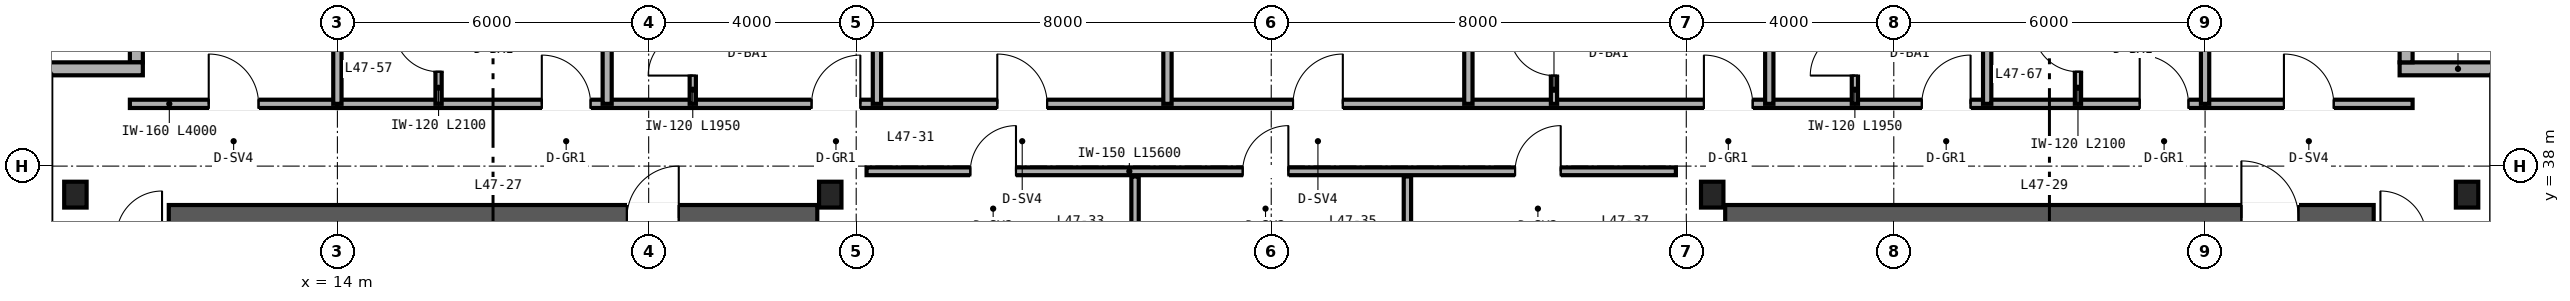
"""IFC4 building model, lengths in metres.
Left out: names, types, materials, properties, quantities, classifications, styles, units other than length and angle.
Written with IfcOpenShell. Run it as: python <this file> out.ifc"""

import sys

from ifc_helpers import new_model, si_unit, direction, frame, frame_2d, origin, origin_2d, place, context, subcontext, project, spatial, rectangle, i_section, extrude, source, transform, mapped, element, fill, save


model = new_model("IFC4")
c1 = context("Model", 3, precision=1e-05, world=origin(), true_north=direction((0.0, 1.0)))
c2 = subcontext(c1, "Body", "Model", "MODEL_VIEW")
j1 = project(units=[si_unit("LENGTHUNIT", "METRE"), si_unit("PLANEANGLEUNIT", "RADIAN")], contexts=[c1])
p1 = place(None, origin())
s1 = spatial("IfcSite", under=j1, at=p1, CompositionType="ELEMENT")
p2 = place(p1, origin())
s2 = spatial("IfcBuilding", under=s1, at=p2, CompositionType="ELEMENT")
p3 = place(p2, frame((0.0, 0.0, 188.4)))
s3 = spatial("IfcBuildingStorey", under=s2, at=p3, CompositionType="ELEMENT", Elevation=188.4)
p4 = place(p3, frame((10.75, 37.0, 0.0), z_axis=(0.0, 0.0, 1.0), x_axis=(1.0, 0.0, 0.0)))
e1 = element("IfcWall", 1, at=p4, inside=s3, PredefinedType="SHEAR", context=c2, shape_type="SweptSolid", body=[
    extrude(rectangle(XDim=12.5, YDim=0.5, at=frame_2d((6.25, 0.0))), origin(), (0.0, 0.0, 1.0), 3.37),
])
p5 = place(p4, frame((8.83, 0.0, 0.0)))
e2 = element("IfcOpeningElement", 2, at=p5, cuts=e1, PredefinedType="OPENING", context=c2, shape_type="SweptSolid", body=[
    extrude(rectangle(XDim=1.0, YDim=2.15, at=frame_2d((0.5, 1.075))), frame((0.0, 0.26, 0.0), z_axis=(0.0, -1.0, 0.0), x_axis=(1.0, 0.0, 0.0)), (0.0, 0.0, 1.0), 0.52),
])
p6 = place(p3, frame((40.75, 37.0, 0.0), z_axis=(0.0, 0.0, 1.0), x_axis=(1.0, 0.0, 0.0)))
e3 = element("IfcWall", 3, at=p6, inside=s3, PredefinedType="SHEAR", context=c2, shape_type="SweptSolid", body=[
    extrude(rectangle(XDim=12.5, YDim=0.5, at=frame_2d((6.25, 0.0))), origin(), (0.0, 0.0, 1.0), 3.37),
])
p7 = place(p6, frame((9.95, 0.0, 0.0)))
e4 = element("IfcOpeningElement", 4, at=p7, cuts=e3, PredefinedType="OPENING", context=c2, shape_type="SweptSolid", body=[
    extrude(rectangle(XDim=1.1, YDim=2.15, at=frame_2d((0.55, 1.075))), frame((0.0, 0.26, 0.0), z_axis=(0.0, -1.0, 0.0), x_axis=(1.0, 0.0, 0.0)), (0.0, 0.0, 1.0), 0.52),
])
m1 = source(origin(), c2, "Body", "SweptSolid", [
    extrude(i_section(OverallWidth=0.432, OverallDepth=0.498, WebThickness=0.056, FlangeThickness=0.089, FilletRadius=0.025, at=origin_2d()), origin(), (0.0, 0.0, 1.0), 3.37),
])
for number, where, z_axis, x_axis in (
    (5, (8.95, 37.45, 0.0), (0.0, 0.0, 1.0), (1.0, 0.0, 0.0)),
    (6, (23.5, 37.45, 0.0), (0.0, 0.0, 1.0), (1.0, 0.0, 0.0)),
    (7, (40.5, 37.45, 0.0), (0.0, 0.0, 1.0), (1.0, 0.0, 0.0)),
    (8, (55.05, 37.45, 0.0), (0.0, 0.0, 1.0), (1.0, 0.0, 0.0)),
):
    element("IfcColumn", number, at=place(p3, frame(where, z_axis=z_axis, x_axis=x_axis)), inside=s3, PredefinedType="COLUMN", context=c2, shape_type="MappedRepresentation", body=[
        mapped(m1, transform((0.0, 0.0, 0.0), scale=1.0)),
    ])
p8 = place(p3, frame((56.0, 39.875, 0.0), z_axis=(0.0, 0.0, 1.0), x_axis=(-1.0, 0.0, 0.0)))
e9 = element("IfcWall", 9, at=p8, inside=s3, PredefinedType="SOLIDWALL", context=c2, shape_type="SweptSolid", body=[
    extrude(rectangle(XDim=2.25, YDim=0.25, at=frame_2d((1.125, 0.0))), origin(), (0.0, 0.0, 1.0), 3.37),
])
for number, where, z_axis, x_axis in (
    (10, (53.875, 40.0, 0.0), (0.0, 0.0, 1.0), (0.0, 1.0, 0.0)),
    (11, (10.125, 42.0, 0.0), (0.0, 0.0, 1.0), (0.0, -1.0, 0.0)),
):
    element("IfcWall", number, at=place(p3, frame(where, z_axis=z_axis, x_axis=x_axis)), inside=s3, PredefinedType="SOLIDWALL", context=c2, shape_type="SweptSolid", body=[
        extrude(rectangle(XDim=2.0, YDim=0.25, at=frame_2d((1.0, 0.0))), origin(), (0.0, 0.0, 1.0), 3.37),
    ])
p9 = place(p3, frame((10.25, 39.875, 0.0), z_axis=(0.0, 0.0, 1.0), x_axis=(-1.0, 0.0, 0.0)))
e12 = element("IfcWall", 12, at=p9, inside=s3, PredefinedType="SOLIDWALL", context=c2, shape_type="SweptSolid", body=[
    extrude(rectangle(XDim=2.25, YDim=0.25, at=frame_2d((1.125, 0.0))), origin(), (0.0, 0.0, 1.0), 3.37),
])
p10 = place(p3, frame((24.2, 37.9, 0.0), z_axis=(0.0, 0.0, 1.0), x_axis=(1.0, 0.0, 0.0)))
e13 = element("IfcWall", 13, at=p10, inside=s3, PredefinedType="PARTITIONING", context=c2, shape_type="SweptSolid", body=[
    extrude(rectangle(XDim=15.6, YDim=0.15, at=frame_2d((7.8, 0.0))), origin(), (0.0, 0.0, 1.0), 3.37),
])
p11 = place(p10, frame((2.0, 0.0, 0.0)))
e14 = element("IfcOpeningElement", 14, at=p11, cuts=e13, PredefinedType="OPENING", context=c2, shape_type="SweptSolid", body=[
    extrude(rectangle(XDim=0.88, YDim=2.15, at=frame_2d((0.44, 1.075))), frame((0.0, 0.085, 0.0), z_axis=(0.0, -1.0, 0.0), x_axis=(1.0, 0.0, 0.0)), (0.0, 0.0, 1.0), 0.17),
])
p12 = place(p10, frame((7.25, 0.0, 0.0)))
e15 = element("IfcOpeningElement", 15, at=p12, cuts=e13, PredefinedType="OPENING", context=c2, shape_type="SweptSolid", body=[
    extrude(rectangle(XDim=0.88, YDim=2.15, at=frame_2d((0.44, 1.075))), frame((0.0, 0.085, 0.0), z_axis=(0.0, -1.0, 0.0), x_axis=(1.0, 0.0, 0.0)), (0.0, 0.0, 1.0), 0.17),
])
p13 = place(p10, frame((12.5, 0.0, 0.0)))
e16 = element("IfcOpeningElement", 16, at=p13, cuts=e13, PredefinedType="OPENING", context=c2, shape_type="SweptSolid", body=[
    extrude(rectangle(XDim=0.88, YDim=2.15, at=frame_2d((0.44, 1.075))), frame((0.0, 0.085, 0.0), z_axis=(0.0, -1.0, 0.0), x_axis=(1.0, 0.0, 0.0)), (0.0, 0.0, 1.0), 0.17),
])
for number, where, z_axis, x_axis in (
    (17, (29.375, 36.12, 0.0), (0.0, 0.0, 1.0), (0.0, 1.0, 0.0)),
    (18, (34.625, 36.12, 0.0), (0.0, 0.0, 1.0), (0.0, 1.0, 0.0)),
):
    element("IfcWall", number, at=place(p3, frame(where, z_axis=z_axis, x_axis=x_axis)), inside=s3, PredefinedType="PARTITIONING", context=c2, shape_type="SweptSolid", body=[
        extrude(rectangle(XDim=1.68, YDim=0.142, at=frame_2d((0.84, 0.0))), origin(), (0.0, 0.0, 1.0), 3.37),
    ])
p14 = place(p3, frame((10.0, 39.2, 0.0), z_axis=(0.0, 0.0, 1.0), x_axis=(1.0, 0.0, 0.0)))
e19 = element("IfcWall", 19, at=p14, inside=s3, PredefinedType="PARTITIONING", context=c2, shape_type="SweptSolid", body=[
    extrude(rectangle(XDim=4.0, YDim=0.16, at=frame_2d((2.0, 0.0))), origin(), (0.0, 0.0, 1.0), 3.37),
])
p15 = place(p14, frame((1.52, 0.0, 0.0)))
e20 = element("IfcOpeningElement", 20, at=p15, cuts=e19, PredefinedType="OPENING", context=c2, shape_type="SweptSolid", body=[
    extrude(rectangle(XDim=0.96, YDim=2.15, at=frame_2d((0.48, 1.075))), frame((0.0, 0.09, 0.0), z_axis=(0.0, -1.0, 0.0), x_axis=(1.0, 0.0, 0.0)), (0.0, 0.0, 1.0), 0.18),
])
p16 = place(p3, frame((50.0, 39.2, 0.0), z_axis=(0.0, 0.0, 1.0), x_axis=(1.0, 0.0, 0.0)))
e21 = element("IfcWall", 21, at=p16, inside=s3, PredefinedType="PARTITIONING", context=c2, shape_type="SweptSolid", body=[
    extrude(rectangle(XDim=4.0, YDim=0.16, at=frame_2d((2.0, 0.0))), origin(), (0.0, 0.0, 1.0), 3.37),
])
p17 = place(p16, frame((1.52, 0.0, 0.0)))
e22 = element("IfcOpeningElement", 22, at=p17, cuts=e21, PredefinedType="OPENING", context=c2, shape_type="SweptSolid", body=[
    extrude(rectangle(XDim=0.96, YDim=2.15, at=frame_2d((0.48, 1.075))), frame((0.0, 0.09, 0.0), z_axis=(0.0, -1.0, 0.0), x_axis=(1.0, 0.0, 0.0)), (0.0, 0.0, 1.0), 0.18),
])
p18 = place(p3, frame((14.0, 39.2, 0.0), z_axis=(0.0, 0.0, 1.0), x_axis=(1.0, 0.0, 0.0)))
e23 = element("IfcWall", 23, at=p18, inside=s3, PredefinedType="PARTITIONING", context=c2, shape_type="SweptSolid", body=[
    extrude(rectangle(XDim=36.0, YDim=0.16, at=frame_2d((18.0, 0.0))), origin(), (0.0, 0.0, 1.0), 2.913),
])
p19 = place(p18, frame((3.94, 0.0, 0.0)))
e24 = element("IfcOpeningElement", 24, at=p19, cuts=e23, PredefinedType="OPENING", context=c2, shape_type="SweptSolid", body=[
    extrude(rectangle(XDim=0.94, YDim=2.15, at=frame_2d((0.47, 1.075))), frame((0.0, 0.09, 0.0), z_axis=(0.0, -1.0, 0.0), x_axis=(1.0, 0.0, 0.0)), (0.0, 0.0, 1.0), 0.18),
])
p20 = place(p18, frame((9.14, 0.0, 0.0)))
e25 = element("IfcOpeningElement", 25, at=p20, cuts=e23, PredefinedType="OPENING", context=c2, shape_type="SweptSolid", body=[
    extrude(rectangle(XDim=0.94, YDim=2.15, at=frame_2d((0.47, 1.075))), frame((0.0, 0.09, 0.0), z_axis=(0.0, -1.0, 0.0), x_axis=(1.0, 0.0, 0.0)), (0.0, 0.0, 1.0), 0.18),
])
p21 = place(p18, frame((12.72, 0.0, 0.0)))
e26 = element("IfcOpeningElement", 26, at=p21, cuts=e23, PredefinedType="OPENING", context=c2, shape_type="SweptSolid", body=[
    extrude(rectangle(XDim=0.96, YDim=2.15, at=frame_2d((0.48, 1.075))), frame((0.0, 0.09, 0.0), z_axis=(0.0, -1.0, 0.0), x_axis=(1.0, 0.0, 0.0)), (0.0, 0.0, 1.0), 0.18),
])
p22 = place(p18, frame((18.42, 0.0, 0.0)))
e27 = element("IfcOpeningElement", 27, at=p22, cuts=e23, PredefinedType="OPENING", context=c2, shape_type="SweptSolid", body=[
    extrude(rectangle(XDim=0.96, YDim=2.15, at=frame_2d((0.48, 1.075))), frame((0.0, 0.09, 0.0), z_axis=(0.0, -1.0, 0.0), x_axis=(1.0, 0.0, 0.0)), (0.0, 0.0, 1.0), 0.18),
])
p23 = place(p18, frame((26.34, 0.0, 0.0)))
e28 = element("IfcOpeningElement", 28, at=p23, cuts=e23, PredefinedType="OPENING", context=c2, shape_type="SweptSolid", body=[
    extrude(rectangle(XDim=0.94, YDim=2.15, at=frame_2d((0.47, 1.075))), frame((0.0, 0.09, 0.0), z_axis=(0.0, -1.0, 0.0), x_axis=(1.0, 0.0, 0.0)), (0.0, 0.0, 1.0), 0.18),
])
p24 = place(p18, frame((30.54, 0.0, 0.0)))
e29 = element("IfcOpeningElement", 29, at=p24, cuts=e23, PredefinedType="OPENING", context=c2, shape_type="SweptSolid", body=[
    extrude(rectangle(XDim=0.94, YDim=2.15, at=frame_2d((0.47, 1.075))), frame((0.0, 0.09, 0.0), z_axis=(0.0, -1.0, 0.0), x_axis=(1.0, 0.0, 0.0)), (0.0, 0.0, 1.0), 0.18),
])
p25 = place(p18, frame((34.74, 0.0, 0.0)))
e30 = element("IfcOpeningElement", 30, at=p25, cuts=e23, PredefinedType="OPENING", context=c2, shape_type="SweptSolid", body=[
    extrude(rectangle(XDim=0.94, YDim=2.15, at=frame_2d((0.47, 1.075))), frame((0.0, 0.09, 0.0), z_axis=(0.0, -1.0, 0.0), x_axis=(1.0, 0.0, 0.0)), (0.0, 0.0, 1.0), 0.18),
])
for number, where, z_axis, x_axis in (
    (31, (14.0, 39.2, 0.0), (0.0, 0.0, 1.0), (0.0, 1.0, 0.0)),
    (32, (50.0, 39.2, 0.0), (0.0, 0.0, 1.0), (0.0, 1.0, 0.0)),
):
    element("IfcWall", number, at=place(p3, frame(where, z_axis=z_axis, x_axis=x_axis)), inside=s3, PredefinedType="PARTITIONING", context=c2, shape_type="SweptSolid", body=[
        extrude(rectangle(XDim=6.44, YDim=0.16, at=frame_2d((3.22, 0.0))), origin(), (0.0, 0.0, 1.0), 2.677),
    ])
p26 = place(p3, frame((19.2, 39.2, 0.0), z_axis=(0.0, 0.0, 1.0), x_axis=(0.0, 1.0, 0.0)))
e33 = element("IfcWall", 33, at=p26, inside=s3, PredefinedType="PARTITIONING", context=c2, shape_type="SweptSolid", body=[
    extrude(rectangle(XDim=6.44, YDim=0.175, at=frame_2d((3.22, 0.0))), origin(), (0.0, 0.0, 1.0), 2.677),
])
p27 = place(p3, frame((15.95, 39.2, 0.0), z_axis=(0.0, 0.0, 1.0), x_axis=(0.0, 1.0, 0.0)))
e34 = element("IfcWall", 34, at=p27, inside=s3, PredefinedType="PARTITIONING", context=c2, shape_type="SweptSolid", body=[
    extrude(rectangle(XDim=2.1, YDim=0.12, at=frame_2d((1.05, 0.0))), origin(), (0.0, 0.0, 1.0), 3.37),
])
p28 = place(p27, frame((0.62, 0.0, 0.0)))
e35 = element("IfcOpeningElement", 35, at=p28, cuts=e34, PredefinedType="OPENING", context=c2, shape_type="SweptSolid", body=[
    extrude(rectangle(XDim=0.86, YDim=2.1, at=frame_2d((0.43, 1.05))), frame((0.0, 0.07, 0.0), z_axis=(0.0, -1.0, 0.0), x_axis=(1.0, 0.0, 0.0)), (0.0, 0.0, 1.0), 0.14),
])
p29 = place(p3, frame((24.4, 39.2, 0.0), z_axis=(0.0, 0.0, 1.0), x_axis=(0.0, 1.0, 0.0)))
e36 = element("IfcWall", 36, at=p29, inside=s3, PredefinedType="PARTITIONING", context=c2, shape_type="SweptSolid", body=[
    extrude(rectangle(XDim=6.44, YDim=0.16, at=frame_2d((3.22, 0.0))), origin(), (0.0, 0.0, 1.0), 2.443),
])
p30 = place(p3, frame((20.85, 39.2, 0.0), z_axis=(0.0, 0.0, 1.0), x_axis=(0.0, 1.0, 0.0)))
e37 = element("IfcWall", 37, at=p30, inside=s3, PredefinedType="PARTITIONING", context=c2, shape_type="SweptSolid", body=[
    extrude(rectangle(XDim=1.95, YDim=0.12, at=frame_2d((0.975, 0.0))), origin(), (0.0, 0.0, 1.0), 3.37),
])
p31 = place(p30, frame((0.545, 0.0, 0.0)))
e38 = element("IfcOpeningElement", 38, at=p31, cuts=e37, PredefinedType="OPENING", context=c2, shape_type="SweptSolid", body=[
    extrude(rectangle(XDim=0.86, YDim=2.1, at=frame_2d((0.43, 1.05))), frame((0.0, 0.07, 0.0), z_axis=(0.0, -1.0, 0.0), x_axis=(1.0, 0.0, 0.0)), (0.0, 0.0, 1.0), 0.14),
])
for number, where, z_axis, x_axis in (
    (39, (30.0, 39.2, 0.0), (0.0, 0.0, 1.0), (0.0, 1.0, 0.0)),
    (40, (35.8, 39.2, 0.0), (0.0, 0.0, 1.0), (0.0, 1.0, 0.0)),
):
    element("IfcWall", number, at=place(p3, frame(where, z_axis=z_axis, x_axis=x_axis)), inside=s3, PredefinedType="PARTITIONING", context=c2, shape_type="SweptSolid", body=[
        extrude(rectangle(XDim=6.44, YDim=0.16, at=frame_2d((3.22, 0.0))), origin(), (0.0, 0.0, 1.0), 2.443),
    ])
p32 = place(p3, frame((41.6, 39.2, 0.0), z_axis=(0.0, 0.0, 1.0), x_axis=(0.0, 1.0, 0.0)))
e41 = element("IfcWall", 41, at=p32, inside=s3, PredefinedType="PARTITIONING", context=c2, shape_type="SweptSolid", body=[
    extrude(rectangle(XDim=6.44, YDim=0.16, at=frame_2d((3.22, 0.0))), origin(), (0.0, 0.0, 1.0), 2.833),
])
p33 = place(p3, frame((37.45, 39.2, 0.0), z_axis=(0.0, 0.0, 1.0), x_axis=(0.0, 1.0, 0.0)))
e42 = element("IfcWall", 42, at=p33, inside=s3, PredefinedType="PARTITIONING", context=c2, shape_type="SweptSolid", body=[
    extrude(rectangle(XDim=1.95, YDim=0.12, at=frame_2d((0.975, 0.0))), origin(), (0.0, 0.0, 1.0), 3.37),
])
p34 = place(p33, frame((0.545, 0.0, 0.0)))
e43 = element("IfcOpeningElement", 43, at=p34, cuts=e42, PredefinedType="OPENING", context=c2, shape_type="SweptSolid", body=[
    extrude(rectangle(XDim=0.86, YDim=2.1, at=frame_2d((0.43, 1.05))), frame((0.0, 0.07, 0.0), z_axis=(0.0, -1.0, 0.0), x_axis=(1.0, 0.0, 0.0)), (0.0, 0.0, 1.0), 0.14),
])
p35 = place(p3, frame((45.8, 39.2, 0.0), z_axis=(0.0, 0.0, 1.0), x_axis=(0.0, 1.0, 0.0)))
e44 = element("IfcWall", 44, at=p35, inside=s3, PredefinedType="PARTITIONING", context=c2, shape_type="SweptSolid", body=[
    extrude(rectangle(XDim=6.44, YDim=0.16, at=frame_2d((3.22, 0.0))), origin(), (0.0, 0.0, 1.0), 2.677),
])
p36 = place(p3, frame((43.25, 39.2, 0.0), z_axis=(0.0, 0.0, 1.0), x_axis=(0.0, 1.0, 0.0)))
e45 = element("IfcWall", 45, at=p36, inside=s3, PredefinedType="PARTITIONING", context=c2, shape_type="SweptSolid", body=[
    extrude(rectangle(XDim=1.95, YDim=0.12, at=frame_2d((0.975, 0.0))), origin(), (0.0, 0.0, 1.0), 3.37),
])
p37 = place(p36, frame((0.545, 0.0, 0.0)))
e46 = element("IfcOpeningElement", 46, at=p37, cuts=e45, PredefinedType="OPENING", context=c2, shape_type="SweptSolid", body=[
    extrude(rectangle(XDim=0.86, YDim=2.1, at=frame_2d((0.43, 1.05))), frame((0.0, 0.07, 0.0), z_axis=(0.0, -1.0, 0.0), x_axis=(1.0, 0.0, 0.0)), (0.0, 0.0, 1.0), 0.14),
])
p38 = place(p3, frame((47.55, 39.2, 0.0), z_axis=(0.0, 0.0, 1.0), x_axis=(0.0, 1.0, 0.0)))
e47 = element("IfcWall", 47, at=p38, inside=s3, PredefinedType="PARTITIONING", context=c2, shape_type="SweptSolid", body=[
    extrude(rectangle(XDim=2.1, YDim=0.12, at=frame_2d((1.05, 0.0))), origin(), (0.0, 0.0, 1.0), 3.37),
])
p39 = place(p38, frame((0.62, 0.0, 0.0)))
e48 = element("IfcOpeningElement", 48, at=p39, cuts=e47, PredefinedType="OPENING", context=c2, shape_type="SweptSolid", body=[
    extrude(rectangle(XDim=0.86, YDim=2.1, at=frame_2d((0.43, 1.05))), frame((0.0, 0.07, 0.0), z_axis=(0.0, -1.0, 0.0), x_axis=(1.0, 0.0, 0.0)), (0.0, 0.0, 1.0), 0.14),
])
m2 = source(origin(), c2, "Body", "SweptSolid", [
    extrude(rectangle(XDim=1.0, YDim=2.15, at=frame_2d((0.5, 1.075))), frame((0.0, 0.025, 0.0), z_axis=(0.0, -1.0, 0.0), x_axis=(1.0, 0.0, 0.0)), (0.0, 0.0, 1.0), 0.05),
])
p40 = place(p5, origin())
e49 = element("IfcDoor", 49, at=p40, inside=s3, OperationType="SINGLE_SWING_RIGHT", PredefinedType="DOOR", context=c2, shape_type="MappedRepresentation", body=[
    mapped(m2, transform((0.0, 0.0, 0.0), scale=1.0)),
])
fill(e2, e49)
m3 = source(origin(), c2, "Body", "SweptSolid", [
    extrude(rectangle(XDim=1.1, YDim=2.15, at=frame_2d((0.55, 1.075))), frame((0.0, 0.025, 0.0), z_axis=(0.0, -1.0, 0.0), x_axis=(1.0, 0.0, 0.0)), (0.0, 0.0, 1.0), 0.05),
])
p41 = place(p7, origin())
e50 = element("IfcDoor", 50, at=p41, inside=s3, OperationType="SINGLE_SWING_LEFT", PredefinedType="DOOR", context=c2, shape_type="MappedRepresentation", body=[
    mapped(m3, transform((0.0, 0.0, 0.0), scale=1.0)),
])
fill(e4, e50)
m4 = source(origin(), c2, "Body", "SweptSolid", [
    extrude(rectangle(XDim=0.88, YDim=2.15, at=frame_2d((0.44, 1.075))), frame((0.0, 0.025, 0.0), z_axis=(0.0, -1.0, 0.0), x_axis=(1.0, 0.0, 0.0)), (0.0, 0.0, 1.0), 0.05),
])
p42 = place(p11, origin())
e51 = element("IfcDoor", 51, at=p42, inside=s3, OperationType="SINGLE_SWING_RIGHT", PredefinedType="DOOR", context=c2, shape_type="MappedRepresentation", body=[
    mapped(m4, transform((0.0, 0.0, 0.0), scale=1.0)),
])
fill(e14, e51)
p43 = place(p12, origin())
e52 = element("IfcDoor", 52, at=p43, inside=s3, OperationType="SINGLE_SWING_RIGHT", PredefinedType="DOOR", context=c2, shape_type="MappedRepresentation", body=[
    mapped(m4, transform((0.0, 0.0, 0.0), scale=1.0)),
])
fill(e15, e52)
p44 = place(p13, origin())
e53 = element("IfcDoor", 53, at=p44, inside=s3, OperationType="SINGLE_SWING_RIGHT", PredefinedType="DOOR", context=c2, shape_type="MappedRepresentation", body=[
    mapped(m4, transform((0.0, 0.0, 0.0), scale=1.0)),
])
fill(e16, e53)
m5 = source(origin(), c2, "Body", "SweptSolid", [
    extrude(rectangle(XDim=0.96, YDim=2.15, at=frame_2d((0.48, 1.075))), frame((0.0, 0.025, 0.0), z_axis=(0.0, -1.0, 0.0), x_axis=(1.0, 0.0, 0.0)), (0.0, 0.0, 1.0), 0.05),
])
p45 = place(p15, origin())
e54 = element("IfcDoor", 54, at=p45, inside=s3, OperationType="SINGLE_SWING_LEFT", PredefinedType="DOOR", context=c2, shape_type="MappedRepresentation", body=[
    mapped(m5, transform((0.0, 0.0, 0.0), scale=1.0)),
])
fill(e20, e54)
p46 = place(p17, origin())
e55 = element("IfcDoor", 55, at=p46, inside=s3, OperationType="SINGLE_SWING_LEFT", PredefinedType="DOOR", context=c2, shape_type="MappedRepresentation", body=[
    mapped(m5, transform((0.0, 0.0, 0.0), scale=1.0)),
])
fill(e22, e55)
m6 = source(origin(), c2, "Body", "SweptSolid", [
    extrude(rectangle(XDim=0.86, YDim=2.1, at=frame_2d((0.43, 1.05))), frame((0.0, 0.025, 0.0), z_axis=(0.0, -1.0, 0.0), x_axis=(1.0, 0.0, 0.0)), (0.0, 0.0, 1.0), 0.05),
])
p47 = place(p28, origin())
e56 = element("IfcDoor", 56, at=p47, inside=s3, OperationType="SINGLE_SWING_RIGHT", PredefinedType="DOOR", context=c2, shape_type="MappedRepresentation", body=[
    mapped(m6, transform((0.0, 0.0, 0.0), scale=1.0)),
])
fill(e35, e56)
p48 = place(p31, origin())
e57 = element("IfcDoor", 57, at=p48, inside=s3, OperationType="SINGLE_SWING_LEFT", PredefinedType="DOOR", context=c2, shape_type="MappedRepresentation", body=[
    mapped(m6, transform((0.0, 0.0, 0.0), scale=1.0)),
])
fill(e38, e57)
p49 = place(p34, origin())
e58 = element("IfcDoor", 58, at=p49, inside=s3, OperationType="SINGLE_SWING_RIGHT", PredefinedType="DOOR", context=c2, shape_type="MappedRepresentation", body=[
    mapped(m6, transform((0.0, 0.0, 0.0), scale=1.0)),
])
fill(e43, e58)
p50 = place(p37, origin())
e59 = element("IfcDoor", 59, at=p50, inside=s3, OperationType="SINGLE_SWING_LEFT", PredefinedType="DOOR", context=c2, shape_type="MappedRepresentation", body=[
    mapped(m6, transform((0.0, 0.0, 0.0), scale=1.0)),
])
fill(e46, e59)
p51 = place(p39, origin())
e60 = element("IfcDoor", 60, at=p51, inside=s3, OperationType="SINGLE_SWING_RIGHT", PredefinedType="DOOR", context=c2, shape_type="MappedRepresentation", body=[
    mapped(m6, transform((0.0, 0.0, 0.0), scale=1.0)),
])
fill(e48, e60)
m7 = source(origin(), c2, "Body", "SweptSolid", [
    extrude(rectangle(XDim=0.94, YDim=2.15, at=frame_2d((0.47, 1.075))), frame((0.0, 0.025, 0.0), z_axis=(0.0, -1.0, 0.0), x_axis=(1.0, 0.0, 0.0)), (0.0, 0.0, 1.0), 0.05),
])
p52 = place(p19, origin())
e61 = element("IfcDoor", 61, at=p52, inside=s3, OperationType="SINGLE_SWING_LEFT", PredefinedType="DOOR", context=c2, shape_type="MappedRepresentation", body=[
    mapped(m7, transform((0.0, 0.0, 0.0), scale=1.0)),
])
fill(e24, e61)
p53 = place(p20, origin())
e62 = element("IfcDoor", 62, at=p53, inside=s3, OperationType="SINGLE_SWING_RIGHT", PredefinedType="DOOR", context=c2, shape_type="MappedRepresentation", body=[
    mapped(m7, transform((0.0, 0.0, 0.0), scale=1.0)),
])
fill(e25, e62)
p54 = place(p21, origin())
e63 = element("IfcDoor", 63, at=p54, inside=s3, OperationType="SINGLE_SWING_LEFT", PredefinedType="DOOR", context=c2, shape_type="MappedRepresentation", body=[
    mapped(m5, transform((0.0, 0.0, 0.0), scale=1.0)),
])
fill(e26, e63)
p55 = place(p22, origin())
e64 = element("IfcDoor", 64, at=p55, inside=s3, OperationType="SINGLE_SWING_RIGHT", PredefinedType="DOOR", context=c2, shape_type="MappedRepresentation", body=[
    mapped(m5, transform((0.0, 0.0, 0.0), scale=1.0)),
])
fill(e27, e64)
p56 = place(p23, origin())
e65 = element("IfcDoor", 65, at=p56, inside=s3, OperationType="SINGLE_SWING_LEFT", PredefinedType="DOOR", context=c2, shape_type="MappedRepresentation", body=[
    mapped(m7, transform((0.0, 0.0, 0.0), scale=1.0)),
])
fill(e28, e65)
p57 = place(p24, origin())
e66 = element("IfcDoor", 66, at=p57, inside=s3, OperationType="SINGLE_SWING_RIGHT", PredefinedType="DOOR", context=c2, shape_type="MappedRepresentation", body=[
    mapped(m7, transform((0.0, 0.0, 0.0), scale=1.0)),
])
fill(e29, e66)
p58 = place(p25, origin())
e67 = element("IfcDoor", 67, at=p58, inside=s3, OperationType="SINGLE_SWING_LEFT", PredefinedType="DOOR", context=c2, shape_type="MappedRepresentation", body=[
    mapped(m7, transform((0.0, 0.0, 0.0), scale=1.0)),
])
fill(e30, e67)
save(model, sys.argv[1])
